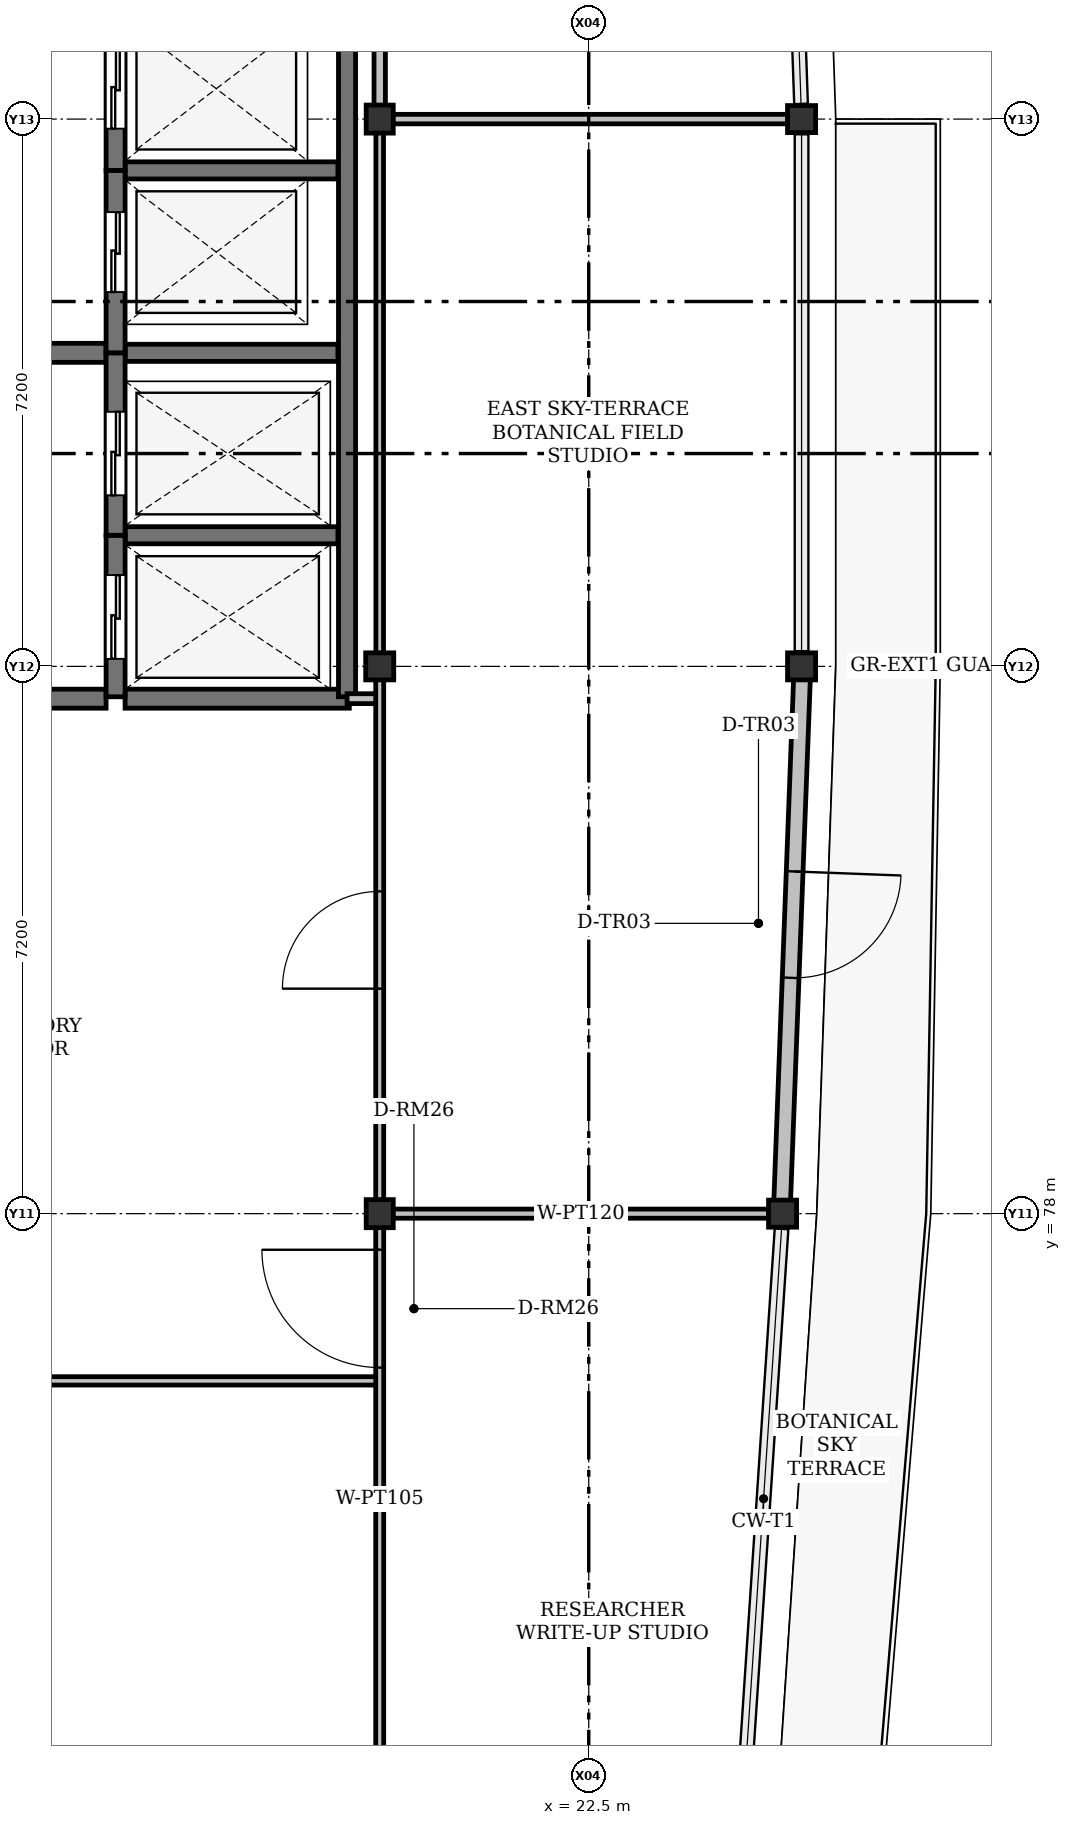
"""IFC4 building model, lengths in metres.
Left out: names, types, materials, properties, quantities, classifications, styles, units other than length and angle.
Written with IfcOpenShell. Run it as: python <this file> out.ifc"""

import sys

from ifc_helpers import new_model, si_unit, direction, frame, frame_2d, origin, origin_2d, place, context, subcontext, project, spatial, rectangle, i_section, extrude, element, fill, save


model = new_model("IFC4")
c1 = context("Model", 3, precision=1e-05, world=origin(), true_north=direction((0.0, 1.0)))
c2 = subcontext(c1, "Body", "Model", "MODEL_VIEW")
j1 = project(units=[si_unit("LENGTHUNIT", "METRE"), si_unit("PLANEANGLEUNIT", "RADIAN")], contexts=[c1])
p1 = place(None, origin())
s1 = spatial("IfcSite", under=j1, at=p1, CompositionType="ELEMENT")
p2 = place(p1, origin())
s2 = spatial("IfcBuilding", under=s1, at=p2, CompositionType="ELEMENT")
p3 = place(p2, frame((0.0, 0.0, 47.7)))
s3 = spatial("IfcBuildingStorey", under=s2, at=p3, CompositionType="ELEMENT", Elevation=47.7)
for number, where, z_axis, x_axis in (
    (1, (19.75, 78.0, 0.0), (0.0, 0.0, 1.0), (0.0, 1.0, 0.0)),
    (2, (25.05, 78.0, 0.0), (0.0, 0.0, 1.0), (1.0, 0.0, 0.0)),
    (3, (19.75, 85.2, 0.0), (0.0, 0.0, 1.0), (1.0, 0.0, 0.0)),
    (4, (25.3, 85.2, 0.0), (0.0, 0.0, 1.0), (1.0, 0.0, 0.0)),
    (5, (19.75, 92.4, 0.0), (0.0, 0.0, 1.0), (0.0, 1.0, 0.0)),
    (6, (25.3, 92.4, 0.0), (0.0, 0.0, 1.0), (1.0, 0.0, 0.0)),
):
    element("IfcColumn", number, at=place(p3, frame(where, z_axis=z_axis, x_axis=x_axis)), inside=s3, PredefinedType="COLUMN", context=c2, shape_type="SweptSolid", body=[
        extrude(i_section(OverallWidth=0.369, OverallDepth=0.356, WebThickness=0.011, FlangeThickness=0.018, FilletRadius=0.015, at=origin_2d()), origin(), (0.0, 0.0, 1.0), 4.2),
    ])
p4 = place(p3, frame((25.311, 85.2, 0.0), z_axis=(0.0, 0.0, 1.0), x_axis=(-0.037818828921, -0.9992846122, 0.0)))
e7 = element("IfcWall", 7, at=p4, inside=s3, PredefinedType="SOLIDWALL", context=c2, shape_type="SweptSolid", body=[
    extrude(rectangle(XDim=7.204, YDim=0.22, at=frame_2d((3.602, 0.0))), origin(), (0.0, 0.0, 1.0), 3.577),
])
p5 = place(p4, frame((2.7, 0.0, 0.0)))
e8 = element("IfcOpeningElement", 8, at=p5, cuts=e7, PredefinedType="OPENING", context=c2, shape_type="SweptSolid", body=[
    extrude(rectangle(XDim=1.4, YDim=2.2, at=frame_2d((0.7, 1.1))), frame((0.0, 0.11, 0.0), z_axis=(0.0, -1.0, 0.0), x_axis=(1.0, 0.0, 0.0)), (0.0, 0.0, 1.0), 0.22),
])
p6 = place(p3, frame((12.12, 89.325, 0.0), z_axis=(0.0, 0.0, 1.0), x_axis=(1.0, 0.0, 0.0)))
e9 = element("IfcWall", 9, at=p6, inside=s3, PredefinedType="SHEAR", context=c2, shape_type="SweptSolid", body=[
    extrude(rectangle(XDim=4.03, YDim=0.25, at=frame_2d((2.015, 0.0))), origin(), (0.0, 0.0, 1.0), 4.2),
])
p7 = place(p6, frame((1.35, 0.0, 0.0)))
e10 = element("IfcOpeningElement", 10, at=p7, cuts=e9, PredefinedType="OPENING", context=c2, shape_type="SweptSolid", body=[
    extrude(rectangle(XDim=1.3, YDim=2.2, at=frame_2d((0.65, 1.1))), frame((0.0, 0.125, 0.0), z_axis=(0.0, -1.0, 0.0), x_axis=(1.0, 0.0, 0.0)), (0.0, 0.0, 1.0), 0.25),
])
p8 = place(p3, frame((12.12, 84.775, 0.0), z_axis=(0.0, 0.0, 1.0), x_axis=(1.0, 0.0, 0.0)))
e11 = element("IfcWall", 11, at=p8, inside=s3, PredefinedType="SHEAR", context=c2, shape_type="SweptSolid", body=[
    extrude(rectangle(XDim=4.03, YDim=0.25, at=frame_2d((2.015, 0.0))), origin(), (0.0, 0.0, 1.0), 4.2),
])
p9 = place(p8, frame((1.3, 0.0, 0.0)))
e12 = element("IfcOpeningElement", 12, at=p9, cuts=e11, PredefinedType="OPENING", context=c2, shape_type="SweptSolid", body=[
    extrude(rectangle(XDim=1.4, YDim=2.25, at=frame_2d((0.7, 1.125))), frame((0.0, 0.125, 0.0), z_axis=(0.0, -1.0, 0.0), x_axis=(1.0, 0.0, 0.0)), (0.0, 0.0, 1.0), 0.25),
])
p10 = place(p3, frame((16.4, 84.775, 0.0), z_axis=(0.0, 0.0, 1.0), x_axis=(1.0, 0.0, 0.0)))
e13 = element("IfcWall", 13, at=p10, inside=s3, PredefinedType="SHEAR", context=c2, shape_type="SweptSolid", body=[
    extrude(rectangle(XDim=2.95, YDim=0.25, at=frame_2d((1.475, 0.0))), origin(), (0.0, 0.0, 1.0), 4.2),
])
p11 = place(p3, frame((19.32, 84.8, 0.0), z_axis=(0.0, 0.0, 1.0), x_axis=(0.0, 1.0, 0.0)))
e14 = element("IfcWall", 14, at=p11, inside=s3, PredefinedType="SHEAR", context=c2, shape_type="SweptSolid", body=[
    extrude(rectangle(XDim=13.95, YDim=0.225, at=frame_2d((6.975, 0.0))), origin(), (0.0, 0.0, 1.0), 4.2),
])
for number, where, z_axis, x_axis in (
    (15, (16.4, 86.925, 0.0), (0.0, 0.0, 1.0), (1.0, 0.0, 0.0)),
    (16, (16.4, 89.325, 0.0), (0.0, 0.0, 1.0), (1.0, 0.0, 0.0)),
    (17, (16.4, 91.725, 0.0), (0.0, 0.0, 1.0), (1.0, 0.0, 0.0)),
):
    element("IfcWall", number, at=place(p3, frame(where, z_axis=z_axis, x_axis=x_axis)), inside=s3, PredefinedType="SHEAR", context=c2, shape_type="SweptSolid", body=[
        extrude(rectangle(XDim=2.8, YDim=0.225, at=frame_2d((1.4, 0.0))), origin(), (0.0, 0.0, 1.0), 4.2),
    ])
p12 = place(p3, frame((16.275, 84.8, 0.0), z_axis=(0.0, 0.0, 1.0), x_axis=(0.0, 1.0, 0.0)))
e18 = element("IfcWall", 18, at=p12, inside=s3, PredefinedType="SHEAR", context=c2, shape_type="SweptSolid", body=[
    extrude(rectangle(XDim=2.125, YDim=0.25, at=frame_2d((1.062, 0.0))), origin(), (0.0, 0.0, 1.0), 4.2),
])
p13 = place(p12, frame((0.5, 0.0, 0.0)))
e19 = element("IfcOpeningElement", 19, at=p13, cuts=e18, PredefinedType="OPENING", context=c2, shape_type="SweptSolid", body=[
    extrude(rectangle(XDim=1.1, YDim=2.15, at=frame_2d((0.55, 1.075))), frame((0.0, 0.125, 0.0), z_axis=(0.0, -1.0, 0.0), x_axis=(1.0, 0.0, 0.0)), (0.0, 0.0, 1.0), 0.25),
])
p14 = place(p3, frame((16.275, 86.925, 0.0), z_axis=(0.0, 0.0, 1.0), x_axis=(0.0, 1.0, 0.0)))
e20 = element("IfcWall", 20, at=p14, inside=s3, PredefinedType="SHEAR", context=c2, shape_type="SweptSolid", body=[
    extrude(rectangle(XDim=2.4, YDim=0.25, at=frame_2d((1.2, 0.0))), origin(), (0.0, 0.0, 1.0), 4.2),
])
p15 = place(p14, frame((0.525, 0.0, 0.0)))
e21 = element("IfcOpeningElement", 21, at=p15, cuts=e20, PredefinedType="OPENING", context=c2, shape_type="SweptSolid", body=[
    extrude(rectangle(XDim=1.1, YDim=2.15, at=frame_2d((0.55, 1.075))), frame((0.0, 0.125, 0.0), z_axis=(0.0, -1.0, 0.0), x_axis=(1.0, 0.0, 0.0)), (0.0, 0.0, 1.0), 0.25),
])
p16 = place(p3, frame((16.275, 89.325, 0.0), z_axis=(0.0, 0.0, 1.0), x_axis=(0.0, 1.0, 0.0)))
e22 = element("IfcWall", 22, at=p16, inside=s3, PredefinedType="SHEAR", context=c2, shape_type="SweptSolid", body=[
    extrude(rectangle(XDim=2.4, YDim=0.25, at=frame_2d((1.2, 0.0))), origin(), (0.0, 0.0, 1.0), 4.2),
])
p17 = place(p16, frame((0.8, 0.0, 0.0)))
e23 = element("IfcOpeningElement", 23, at=p17, cuts=e22, PredefinedType="OPENING", context=c2, shape_type="SweptSolid", body=[
    extrude(rectangle(XDim=1.05, YDim=2.15, at=frame_2d((0.525, 1.075))), frame((0.0, 0.125, 0.0), z_axis=(0.0, -1.0, 0.0), x_axis=(1.0, 0.0, 0.0)), (0.0, 0.0, 1.0), 0.25),
])
p18 = place(p3, frame((16.275, 91.725, 0.0), z_axis=(0.0, 0.0, 1.0), x_axis=(0.0, 1.0, 0.0)))
e24 = element("IfcWall", 24, at=p18, inside=s3, PredefinedType="SHEAR", context=c2, shape_type="SweptSolid", body=[
    extrude(rectangle(XDim=2.175, YDim=0.25, at=frame_2d((1.087, 0.0))), origin(), (0.0, 0.0, 1.0), 4.2),
])
p19 = place(p18, frame((0.55, 0.0, 0.0)))
e25 = element("IfcOpeningElement", 25, at=p19, cuts=e24, PredefinedType="OPENING", context=c2, shape_type="SweptSolid", body=[
    extrude(rectangle(XDim=1.05, YDim=2.15, at=frame_2d((0.525, 1.075))), frame((0.0, 0.125, 0.0), z_axis=(0.0, -1.0, 0.0), x_axis=(1.0, 0.0, 0.0)), (0.0, 0.0, 1.0), 0.25),
])
p20 = place(p3, frame((19.32, 84.775, 0.0), z_axis=(0.0, 0.0, 1.0), x_axis=(1.0, 0.0, 0.0)))
e26 = element("IfcWall", 26, at=p20, inside=s3, PredefinedType="PARTITIONING", context=c2, shape_type="SweptSolid", body=[
    extrude(rectangle(XDim=0.43, YDim=0.13, at=frame_2d((0.215, 0.0))), origin(), (0.0, 0.0, 1.0), 3.527),
])
p21 = place(p3, frame((19.75, 78.179, 0.0), z_axis=(0.0, 0.0, 1.0), x_axis=(0.0, 1.0, 0.0)))
e27 = element("IfcWall", 27, at=p21, inside=s3, PredefinedType="PARTITIONING", context=c2, shape_type="SweptSolid", body=[
    extrude(rectangle(XDim=6.848, YDim=0.105, at=frame_2d((3.424, 0.0))), origin(), (0.0, 0.0, 1.0), 3.527),
])
p22 = place(p21, frame((2.781, 0.0, 0.0)))
e28 = element("IfcOpeningElement", 28, at=p22, cuts=e27, PredefinedType="OPENING", context=c2, shape_type="SweptSolid", body=[
    extrude(rectangle(XDim=1.28, YDim=2.25, at=frame_2d((0.64, 1.125))), frame((0.0, 0.052, 0.0), z_axis=(0.0, -1.0, 0.0), x_axis=(1.0, 0.0, 0.0)), (0.0, 0.0, 1.0), 0.105),
])
p23 = place(p3, frame((19.75, 85.373, 0.0), z_axis=(0.0, 0.0, 1.0), x_axis=(0.0, 1.0, 0.0)))
e29 = element("IfcWall", 29, at=p23, inside=s3, PredefinedType="PARTITIONING", context=c2, shape_type="SweptSolid", body=[
    extrude(rectangle(XDim=6.847, YDim=0.1, at=frame_2d((3.424, 0.0))), origin(), (0.0, 0.0, 1.0), 3.527),
])
p24 = place(p3, frame((19.75, 92.58, 0.0), z_axis=(0.0, 0.0, 1.0), x_axis=(0.0, 1.0, 0.0)))
e30 = element("IfcWall", 30, at=p24, inside=s3, PredefinedType="PARTITIONING", context=c2, shape_type="SweptSolid", body=[
    extrude(rectangle(XDim=6.847, YDim=0.15, at=frame_2d((3.424, 0.0))), origin(), (0.0, 0.0, 1.0), 3.527),
])
p25 = place(p3, frame((25.121, 92.4, 0.0), z_axis=(0.0, 0.0, 1.0), x_axis=(-1.0, 0.0, 0.0)))
e31 = element("IfcWall", 31, at=p25, inside=s3, PredefinedType="PARTITIONING", context=c2, shape_type="SweptSolid", body=[
    extrude(rectangle(XDim=5.198, YDim=0.125, at=frame_2d((2.599, 0.0))), origin(), (0.0, 0.0, 1.0), 3.451),
])
p26 = place(p3, frame((24.871, 78.0, 0.0), z_axis=(0.0, 0.0, 1.0), x_axis=(-1.0, 0.0, 0.0)))
e32 = element("IfcWall", 32, at=p26, inside=s3, PredefinedType="PARTITIONING", context=c2, shape_type="SweptSolid", body=[
    extrude(rectangle(XDim=4.948, YDim=0.12, at=frame_2d((2.474, 0.0))), origin(), (0.0, 0.0, 1.0), 3.451),
])
p27 = place(p3, frame((7.85, 75.8, 0.0), z_axis=(0.0, 0.0, 1.0), x_axis=(1.0, 0.0, 0.0)))
e33 = element("IfcWall", 33, at=p27, inside=s3, PredefinedType="PARTITIONING", context=c2, shape_type="SweptSolid", body=[
    extrude(rectangle(XDim=11.9, YDim=0.11, at=frame_2d((5.95, 0.0))), origin(), (0.0, 0.0, 1.0), 3.527),
])
p28 = place(p27, frame((5.24, 0.0, 0.0)))
e34 = element("IfcOpeningElement", 34, at=p28, cuts=e33, PredefinedType="OPENING", context=c2, shape_type="SweptSolid", body=[
    extrude(rectangle(XDim=1.42, YDim=2.3, at=frame_2d((0.71, 1.15))), frame((0.0, 0.055, 0.0), z_axis=(0.0, -1.0, 0.0), x_axis=(1.0, 0.0, 0.0)), (0.0, 0.0, 1.0), 0.11),
])
p29 = place(p3, frame((19.75, 70.673, 0.0), z_axis=(0.0, 0.0, 1.0), x_axis=(0.0, 1.0, 0.0)))
e35 = element("IfcWall", 35, at=p29, inside=s3, PredefinedType="PARTITIONING", context=c2, shape_type="SweptSolid", body=[
    extrude(rectangle(XDim=7.147, YDim=0.105, at=frame_2d((3.574, 0.0))), origin(), (0.0, 0.0, 1.0), 3.527),
])
p30 = place(p29, frame((5.302, 0.0, 0.0)))
e36 = element("IfcOpeningElement", 36, at=p30, cuts=e35, PredefinedType="OPENING", context=c2, shape_type="SweptSolid", body=[
    extrude(rectangle(XDim=1.55, YDim=2.3, at=frame_2d((0.775, 1.15))), frame((0.0, 0.052, 0.0), z_axis=(0.0, -1.0, 0.0), x_axis=(1.0, 0.0, 0.0)), (0.0, 0.0, 1.0), 0.105),
])
p31 = place(p5, origin())
e37 = element("IfcDoor", 37, at=p31, inside=s3, OperationType="SINGLE_SWING_LEFT", PredefinedType="DOOR", context=c2, shape_type="SweptSolid", body=[
    extrude(rectangle(XDim=1.4, YDim=2.2, at=frame_2d((0.7, 1.1))), frame((0.0, 0.025, 0.0), z_axis=(0.0, -1.0, 0.0), x_axis=(1.0, 0.0, 0.0)), (0.0, 0.0, 1.0), 0.05),
])
fill(e8, e37)
p32 = place(p13, origin())
e38 = element("IfcDoor", 38, at=p32, inside=s3, OperationType="SLIDING_TO_LEFT", PredefinedType="DOOR", context=c2, shape_type="SweptSolid", body=[
    extrude(rectangle(XDim=1.1, YDim=2.15, at=frame_2d((0.55, 1.075))), frame((0.0, 0.025, 0.0), z_axis=(0.0, -1.0, 0.0), x_axis=(1.0, 0.0, 0.0)), (0.0, 0.0, 1.0), 0.05),
])
fill(e19, e38)
p33 = place(p15, origin())
e39 = element("IfcDoor", 39, at=p33, inside=s3, OperationType="SLIDING_TO_LEFT", PredefinedType="DOOR", context=c2, shape_type="SweptSolid", body=[
    extrude(rectangle(XDim=1.1, YDim=2.15, at=frame_2d((0.55, 1.075))), frame((0.0, 0.025, 0.0), z_axis=(0.0, -1.0, 0.0), x_axis=(1.0, 0.0, 0.0)), (0.0, 0.0, 1.0), 0.05),
])
fill(e21, e39)
p34 = place(p17, origin())
e40 = element("IfcDoor", 40, at=p34, inside=s3, OperationType="SLIDING_TO_LEFT", PredefinedType="DOOR", context=c2, shape_type="SweptSolid", body=[
    extrude(rectangle(XDim=1.05, YDim=2.15, at=frame_2d((0.525, 1.075))), frame((0.0, 0.025, 0.0), z_axis=(0.0, -1.0, 0.0), x_axis=(1.0, 0.0, 0.0)), (0.0, 0.0, 1.0), 0.05),
])
fill(e23, e40)
p35 = place(p19, origin())
e41 = element("IfcDoor", 41, at=p35, inside=s3, OperationType="SLIDING_TO_LEFT", PredefinedType="DOOR", context=c2, shape_type="SweptSolid", body=[
    extrude(rectangle(XDim=1.05, YDim=2.15, at=frame_2d((0.525, 1.075))), frame((0.0, 0.025, 0.0), z_axis=(0.0, -1.0, 0.0), x_axis=(1.0, 0.0, 0.0)), (0.0, 0.0, 1.0), 0.05),
])
fill(e25, e41)
p36 = place(p22, origin())
e42 = element("IfcDoor", 42, at=p36, inside=s3, OperationType="SINGLE_SWING_LEFT", PredefinedType="DOOR", context=c2, shape_type="SweptSolid", body=[
    extrude(rectangle(XDim=1.28, YDim=2.25, at=frame_2d((0.64, 1.125))), frame((0.0, 0.025, 0.0), z_axis=(0.0, -1.0, 0.0), x_axis=(1.0, 0.0, 0.0)), (0.0, 0.0, 1.0), 0.05),
])
fill(e28, e42)
p37 = place(p30, origin())
e43 = element("IfcDoor", 43, at=p37, inside=s3, OperationType="SINGLE_SWING_RIGHT", PredefinedType="DOOR", context=c2, shape_type="SweptSolid", body=[
    extrude(rectangle(XDim=1.55, YDim=2.3, at=frame_2d((0.775, 1.15))), frame((0.0, 0.025, 0.0), z_axis=(0.0, -1.0, 0.0), x_axis=(1.0, 0.0, 0.0)), (0.0, 0.0, 1.0), 0.05),
])
fill(e36, e43)
save(model, sys.argv[1])
